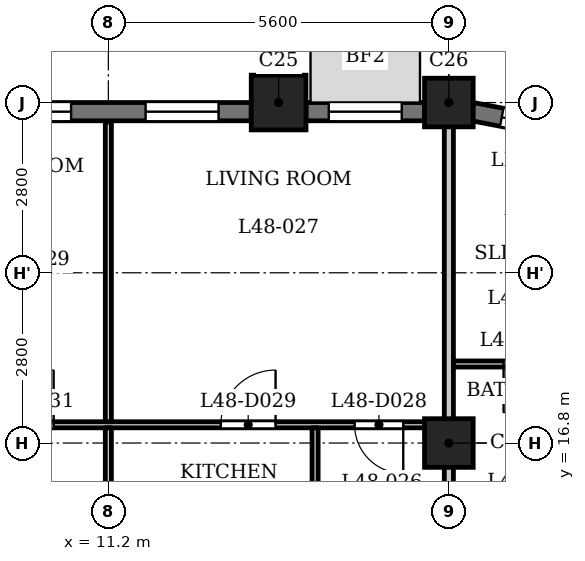
"""IFC4 building model, lengths in metres.
Left out: names, types, materials, properties, quantities, classifications, styles, units other than length and angle.
Written with IfcOpenShell. Run it as: python <this file> out.ifc"""

import sys

from ifc_helpers import new_model, si_unit, direction, frame, frame_2d, origin, origin_2d, place, context, subcontext, project, spatial, rectangle, extrude, element, fill, save


model = new_model("IFC4")
c1 = context("Model", 3, precision=1e-05, world=origin(), true_north=direction((0.0, 1.0)))
c2 = subcontext(c1, "Body", "Model", "MODEL_VIEW")
j1 = project(units=[si_unit("LENGTHUNIT", "METRE"), si_unit("PLANEANGLEUNIT", "RADIAN")], contexts=[c1])
p1 = place(None, origin())
s1 = spatial("IfcSite", under=j1, at=p1, CompositionType="ELEMENT")
p2 = place(p1, origin())
s2 = spatial("IfcBuilding", under=s1, at=p2, CompositionType="ELEMENT")
p3 = place(p2, frame((0.0, 0.0, 188.9)))
s3 = spatial("IfcBuildingStorey", under=s2, at=p3, CompositionType="ELEMENT", Elevation=188.9)
p4 = place(p3, frame((14.0, 22.4, 0.0), z_axis=(0.0, 0.0, 1.0), x_axis=(1.0, 0.0, 0.0)))
e1 = element("IfcColumn", 1, at=p4, inside=s3, PredefinedType="COLUMN", context=c2, shape_type="SweptSolid", body=[
    extrude(rectangle(XDim=0.9, YDim=0.9, at=origin_2d()), origin(), (0.0, 0.0, 1.0), 3.5),
])
for number, where, z_axis, x_axis in (
    (2, (16.8, 16.8, 0.0), (0.0, 0.0, 1.0), (1.0, 0.0, 0.0)),
    (3, (16.8, 22.4, 0.0), (0.0, 0.0, 1.0), (1.0, 0.0, 0.0)),
):
    element("IfcColumn", number, at=place(p3, frame(where, z_axis=z_axis, x_axis=x_axis)), inside=s3, PredefinedType="COLUMN", context=c2, shape_type="SweptSolid", body=[
        extrude(rectangle(XDim=0.8, YDim=0.8, at=origin_2d()), origin(), (0.0, 0.0, 1.0), 3.5),
    ])
p5 = place(p3, frame((18.946, 21.914, 0.0), z_axis=(0.0, 0.0, 1.0), x_axis=(-0.98230529033, 0.187286722942, 0.0)))
e4 = element("IfcWall", 4, at=p5, inside=s3, PredefinedType="SOLIDWALL", context=c2, shape_type="SweptSolid", body=[
    extrude(rectangle(XDim=1.799, YDim=0.3, at=frame_2d((0.899, 0.0))), origin(), (0.0, 0.0, 1.0), 2.5),
])
p6 = place(p5, frame((0.5, 0.0, 0.6)))
e5 = element("IfcOpeningElement", 5, at=p6, cuts=e4, PredefinedType="OPENING", context=c2, shape_type="SweptSolid", body=[
    extrude(rectangle(XDim=0.8, YDim=1.55, at=frame_2d((0.4, 0.775))), frame((0.0, 0.16, 0.0), z_axis=(0.0, -1.0, 0.0), x_axis=(1.0, 0.0, 0.0)), (0.0, 0.0, 1.0), 0.32),
])
p7 = place(p3, frame((16.4, 22.25, 0.0), z_axis=(0.0, 0.0, 1.0), x_axis=(-1.0, 0.0, 0.0)))
e6 = element("IfcWall", 6, at=p7, inside=s3, PredefinedType="SOLIDWALL", context=c2, shape_type="SweptSolid", body=[
    extrude(rectangle(XDim=1.95, YDim=0.3, at=frame_2d((0.975, 0.0))), origin(), (0.0, 0.0, 1.0), 2.5),
])
p8 = place(p7, frame((0.375, 0.0, 0.6)))
e7 = element("IfcOpeningElement", 7, at=p8, cuts=e6, PredefinedType="OPENING", context=c2, shape_type="SweptSolid", body=[
    extrude(rectangle(XDim=1.2, YDim=1.55, at=frame_2d((0.6, 0.775))), frame((0.0, 0.16, 0.0), z_axis=(0.0, -1.0, 0.0), x_axis=(1.0, 0.0, 0.0)), (0.0, 0.0, 1.0), 0.32),
])
p9 = place(p3, frame((13.55, 22.25, 0.0), z_axis=(0.0, 0.0, 1.0), x_axis=(-1.0, 0.0, 0.0)))
e8 = element("IfcWall", 8, at=p9, inside=s3, PredefinedType="SOLIDWALL", context=c2, shape_type="SweptSolid", body=[
    extrude(rectangle(XDim=4.7, YDim=0.3, at=frame_2d((2.35, 0.0))), origin(), (0.0, 0.0, 1.0), 2.5),
])
p10 = place(p9, frame((0.538, 0.0, 0.6)))
e9 = element("IfcOpeningElement", 9, at=p10, cuts=e8, PredefinedType="OPENING", context=c2, shape_type="SweptSolid", body=[
    extrude(rectangle(XDim=1.2, YDim=1.55, at=frame_2d((0.6, 0.775))), frame((0.0, 0.16, 0.0), z_axis=(0.0, -1.0, 0.0), x_axis=(1.0, 0.0, 0.0)), (0.0, 0.0, 1.0), 0.32),
])
p11 = place(p9, frame((2.962, 0.0, 0.6)))
e10 = element("IfcOpeningElement", 10, at=p11, cuts=e8, PredefinedType="OPENING", context=c2, shape_type="SweptSolid", body=[
    extrude(rectangle(XDim=1.2, YDim=1.55, at=frame_2d((0.6, 0.775))), frame((0.0, 0.16, 0.0), z_axis=(0.0, -1.0, 0.0), x_axis=(1.0, 0.0, 0.0)), (0.0, 0.0, 1.0), 0.32),
])
p12 = place(p3, frame((-16.725, 17.1, 0.0), z_axis=(0.0, 0.0, 1.0), x_axis=(1.0, 0.0, 0.0)))
e11 = element("IfcWall", 11, at=p12, inside=s3, PredefinedType="PARTITIONING", context=c2, shape_type="SweptSolid", body=[
    extrude(rectangle(XDim=33.45, YDim=0.1, at=frame_2d((16.725, 0.0))), origin(), (0.0, 0.0, 1.0), 3.2),
])
p13 = place(p12, frame((4.075, 0.0, 0.0)))
e12 = element("IfcOpeningElement", 12, at=p13, cuts=e11, PredefinedType="OPENING", context=c2, shape_type="SweptSolid", body=[
    extrude(rectangle(XDim=0.8, YDim=2.1, at=frame_2d((0.4, 1.05))), frame((0.0, 0.06, 0.0), z_axis=(0.0, -1.0, 0.0), x_axis=(1.0, 0.0, 0.0)), (0.0, 0.0, 1.0), 0.12),
])
p14 = place(p12, frame((9.575, 0.0, 0.0)))
e13 = element("IfcOpeningElement", 13, at=p14, cuts=e11, PredefinedType="OPENING", context=c2, shape_type="SweptSolid", body=[
    extrude(rectangle(XDim=0.9, YDim=2.1, at=frame_2d((0.45, 1.05))), frame((0.0, 0.06, 0.0), z_axis=(0.0, -1.0, 0.0), x_axis=(1.0, 0.0, 0.0)), (0.0, 0.0, 1.0), 0.12),
])
p15 = place(p12, frame((15.175, 0.0, 0.0)))
e14 = element("IfcOpeningElement", 14, at=p15, cuts=e11, PredefinedType="OPENING", context=c2, shape_type="SweptSolid", body=[
    extrude(rectangle(XDim=0.8, YDim=2.1, at=frame_2d((0.4, 1.05))), frame((0.0, 0.06, 0.0), z_axis=(0.0, -1.0, 0.0), x_axis=(1.0, 0.0, 0.0)), (0.0, 0.0, 1.0), 0.12),
])
p16 = place(p12, frame((12.975, 0.0, 0.0)))
e15 = element("IfcOpeningElement", 15, at=p16, cuts=e11, PredefinedType="OPENING", context=c2, shape_type="SweptSolid", body=[
    extrude(rectangle(XDim=0.9, YDim=2.1, at=frame_2d((0.45, 1.05))), frame((0.0, 0.06, 0.0), z_axis=(0.0, -1.0, 0.0), x_axis=(1.0, 0.0, 0.0)), (0.0, 0.0, 1.0), 0.12),
])
p17 = place(p12, frame((17.625, 0.0, 0.0)))
e16 = element("IfcOpeningElement", 16, at=p17, cuts=e11, PredefinedType="OPENING", context=c2, shape_type="SweptSolid", body=[
    extrude(rectangle(XDim=0.8, YDim=2.1, at=frame_2d((0.4, 1.05))), frame((0.0, 0.06, 0.0), z_axis=(0.0, -1.0, 0.0), x_axis=(1.0, 0.0, 0.0)), (0.0, 0.0, 1.0), 0.12),
])
p18 = place(p12, frame((20.025, 0.0, 0.0)))
e17 = element("IfcOpeningElement", 17, at=p18, cuts=e11, PredefinedType="OPENING", context=c2, shape_type="SweptSolid", body=[
    extrude(rectangle(XDim=0.9, YDim=2.1, at=frame_2d((0.45, 1.05))), frame((0.0, 0.06, 0.0), z_axis=(0.0, -1.0, 0.0), x_axis=(1.0, 0.0, 0.0)), (0.0, 0.0, 1.0), 0.12),
])
p19 = place(p12, frame((31.975, 0.0, 0.0)))
e18 = element("IfcOpeningElement", 18, at=p19, cuts=e11, PredefinedType="OPENING", context=c2, shape_type="SweptSolid", body=[
    extrude(rectangle(XDim=0.8, YDim=2.1, at=frame_2d((0.4, 1.05))), frame((0.0, 0.06, 0.0), z_axis=(0.0, -1.0, 0.0), x_axis=(1.0, 0.0, 0.0)), (0.0, 0.0, 1.0), 0.12),
])
p20 = place(p12, frame((29.775, 0.0, 0.0)))
e19 = element("IfcOpeningElement", 19, at=p20, cuts=e11, PredefinedType="OPENING", context=c2, shape_type="SweptSolid", body=[
    extrude(rectangle(XDim=0.9, YDim=2.1, at=frame_2d((0.45, 1.05))), frame((0.0, 0.06, 0.0), z_axis=(0.0, -1.0, 0.0), x_axis=(1.0, 0.0, 0.0)), (0.0, 0.0, 1.0), 0.12),
])
p21 = place(p12, frame((23.025, 0.0, 0.0)))
e20 = element("IfcOpeningElement", 20, at=p21, cuts=e11, PredefinedType="OPENING", context=c2, shape_type="SweptSolid", body=[
    extrude(rectangle(XDim=0.9, YDim=2.1, at=frame_2d((0.45, 1.05))), frame((0.0, 0.06, 0.0), z_axis=(0.0, -1.0, 0.0), x_axis=(1.0, 0.0, 0.0)), (0.0, 0.0, 1.0), 0.12),
])
p22 = place(p12, frame((26.125, 0.0, 0.0)))
e21 = element("IfcOpeningElement", 21, at=p22, cuts=e11, PredefinedType="OPENING", context=c2, shape_type="SweptSolid", body=[
    extrude(rectangle(XDim=0.9, YDim=2.1, at=frame_2d((0.45, 1.05))), frame((0.0, 0.06, 0.0), z_axis=(0.0, -1.0, 0.0), x_axis=(1.0, 0.0, 0.0)), (0.0, 0.0, 1.0), 0.12),
])
p23 = place(p3, frame((16.875, 18.1, 0.0), z_axis=(0.0, 0.0, 1.0), x_axis=(1.0, 0.0, 0.0)))
e22 = element("IfcWall", 22, at=p23, inside=s3, PredefinedType="PARTITIONING", context=c2, shape_type="SweptSolid", body=[
    extrude(rectangle(XDim=6.515, YDim=0.1, at=frame_2d((3.258, 0.0))), origin(), (0.0, 0.0, 1.0), 3.2),
])
p24 = place(p23, frame((0.825, 0.0, 0.0)))
e23 = element("IfcOpeningElement", 23, at=p24, cuts=e22, PredefinedType="OPENING", context=c2, shape_type="SweptSolid", body=[
    extrude(rectangle(XDim=0.8, YDim=2.1, at=frame_2d((0.4, 1.05))), frame((0.0, 0.06, 0.0), z_axis=(0.0, -1.0, 0.0), x_axis=(1.0, 0.0, 0.0)), (0.0, 0.0, 1.0), 0.12),
])
p25 = place(p23, frame((3.239, 0.0, 0.0)))
e24 = element("IfcOpeningElement", 24, at=p25, cuts=e22, PredefinedType="OPENING", context=c2, shape_type="SweptSolid", body=[
    extrude(rectangle(XDim=0.9, YDim=2.1, at=frame_2d((0.45, 1.05))), frame((0.0, 0.06, 0.0), z_axis=(0.0, -1.0, 0.0), x_axis=(1.0, 0.0, 0.0)), (0.0, 0.0, 1.0), 0.12),
])
p26 = place(p3, frame((11.2, 13.275, 0.0), z_axis=(0.0, 0.0, 1.0), x_axis=(0.0, 1.0, 0.0)))
e25 = element("IfcWall", 25, at=p26, inside=s3, PredefinedType="PARTITIONING", context=c2, shape_type="SweptSolid", body=[
    extrude(rectangle(XDim=3.775, YDim=0.1, at=frame_2d((1.888, 0.0))), origin(), (0.0, 0.0, 1.0), 3.2),
])
p27 = place(p26, frame((0.576, 0.0, 0.0)))
e26 = element("IfcOpeningElement", 26, at=p27, cuts=e25, PredefinedType="OPENING", context=c2, shape_type="SweptSolid", body=[
    extrude(rectangle(XDim=0.9, YDim=2.1, at=frame_2d((0.45, 1.05))), frame((0.0, 0.06, 0.0), z_axis=(0.0, -1.0, 0.0), x_axis=(1.0, 0.0, 0.0)), (0.0, 0.0, 1.0), 0.12),
])
p28 = place(p3, frame((11.2, 17.15, 0.0), z_axis=(0.0, 0.0, 1.0), x_axis=(0.0, 1.0, 0.0)))
e27 = element("IfcWall", 27, at=p28, inside=s3, PredefinedType="PARTITIONING", context=c2, shape_type="SweptSolid", body=[
    extrude(rectangle(XDim=4.93, YDim=0.1, at=frame_2d((2.465, 0.0))), origin(), (0.0, 0.0, 1.0), 3.2),
])
p29 = place(p3, frame((14.6, 13.275, 0.0), z_axis=(0.0, 0.0, 1.0), x_axis=(0.0, 1.0, 0.0)))
e28 = element("IfcWall", 28, at=p29, inside=s3, PredefinedType="PARTITIONING", context=c2, shape_type="SweptSolid", body=[
    extrude(rectangle(XDim=3.775, YDim=0.1, at=frame_2d((1.888, 0.0))), origin(), (0.0, 0.0, 1.0), 3.2),
])
p30 = place(p3, frame((16.8, 15.475, 0.0), z_axis=(0.0, 0.0, 1.0), x_axis=(0.0, 1.0, 0.0)))
e29 = element("IfcWall", 29, at=p30, inside=s3, PredefinedType="PARTITIONING", context=c2, shape_type="SweptSolid", body=[
    extrude(rectangle(XDim=6.835, YDim=0.15, at=frame_2d((3.417, 0.0))), origin(), (0.0, 0.0, 1.0), 2.55),
])
p31 = place(p19, origin())
e30 = element("IfcDoor", 30, at=p31, inside=s3, OperationType="SINGLE_SWING_RIGHT", PredefinedType="DOOR", context=c2, shape_type="SweptSolid", body=[
    extrude(rectangle(XDim=0.8, YDim=2.1, at=frame_2d((0.4, 1.05))), frame((0.0, 0.025, 0.0), z_axis=(0.0, -1.0, 0.0), x_axis=(1.0, 0.0, 0.0)), (0.0, 0.0, 1.0), 0.05),
])
fill(e18, e30)
p32 = place(p20, origin())
e31 = element("IfcDoor", 31, at=p32, inside=s3, OperationType="SINGLE_SWING_LEFT", PredefinedType="DOOR", context=c2, shape_type="SweptSolid", body=[
    extrude(rectangle(XDim=0.9, YDim=2.1, at=frame_2d((0.45, 1.05))), frame((0.0, 0.025, 0.0), z_axis=(0.0, -1.0, 0.0), x_axis=(1.0, 0.0, 0.0)), (0.0, 0.0, 1.0), 0.05),
])
fill(e19, e31)
p33 = place(p22, origin())
e32 = element("IfcDoor", 32, at=p33, inside=s3, OperationType="SINGLE_SWING_LEFT", PredefinedType="DOOR", context=c2, shape_type="SweptSolid", body=[
    extrude(rectangle(XDim=0.9, YDim=2.1, at=frame_2d((0.45, 1.05))), frame((0.0, 0.025, 0.0), z_axis=(0.0, -1.0, 0.0), x_axis=(1.0, 0.0, 0.0)), (0.0, 0.0, 1.0), 0.05),
])
fill(e21, e32)
p34 = place(p24, origin())
e33 = element("IfcDoor", 33, at=p34, inside=s3, OperationType="SINGLE_SWING_LEFT", PredefinedType="DOOR", context=c2, shape_type="SweptSolid", body=[
    extrude(rectangle(XDim=0.8, YDim=2.1, at=frame_2d((0.4, 1.05))), frame((0.0, 0.025, 0.0), z_axis=(0.0, -1.0, 0.0), x_axis=(1.0, 0.0, 0.0)), (0.0, 0.0, 1.0), 0.05),
])
fill(e23, e33)
p35 = place(p6, origin())
e34 = element("IfcWindow", 34, at=p35, inside=s3, PartitioningType="SINGLE_PANEL", PredefinedType="WINDOW", context=c2, shape_type="SweptSolid", body=[
    extrude(rectangle(XDim=0.8, YDim=1.55, at=frame_2d((0.4, 0.775))), frame((0.0, 0.03, 0.0), z_axis=(0.0, -1.0, 0.0), x_axis=(1.0, 0.0, 0.0)), (0.0, 0.0, 1.0), 0.06),
])
fill(e5, e34)
p36 = place(p8, origin())
e35 = element("IfcWindow", 35, at=p36, inside=s3, PartitioningType="SINGLE_PANEL", PredefinedType="WINDOW", context=c2, shape_type="SweptSolid", body=[
    extrude(rectangle(XDim=1.2, YDim=1.55, at=frame_2d((0.6, 0.775))), frame((0.0, 0.03, 0.0), z_axis=(0.0, -1.0, 0.0), x_axis=(1.0, 0.0, 0.0)), (0.0, 0.0, 1.0), 0.06),
])
fill(e7, e35)
p37 = place(p10, origin())
e36 = element("IfcWindow", 36, at=p37, inside=s3, PartitioningType="SINGLE_PANEL", PredefinedType="WINDOW", context=c2, shape_type="SweptSolid", body=[
    extrude(rectangle(XDim=1.2, YDim=1.55, at=frame_2d((0.6, 0.775))), frame((0.0, 0.03, 0.0), z_axis=(0.0, -1.0, 0.0), x_axis=(1.0, 0.0, 0.0)), (0.0, 0.0, 1.0), 0.06),
])
fill(e9, e36)
p38 = place(p11, origin())
e37 = element("IfcWindow", 37, at=p38, inside=s3, PartitioningType="SINGLE_PANEL", PredefinedType="WINDOW", context=c2, shape_type="SweptSolid", body=[
    extrude(rectangle(XDim=1.2, YDim=1.55, at=frame_2d((0.6, 0.775))), frame((0.0, 0.03, 0.0), z_axis=(0.0, -1.0, 0.0), x_axis=(1.0, 0.0, 0.0)), (0.0, 0.0, 1.0), 0.06),
])
fill(e10, e37)
save(model, sys.argv[1])
